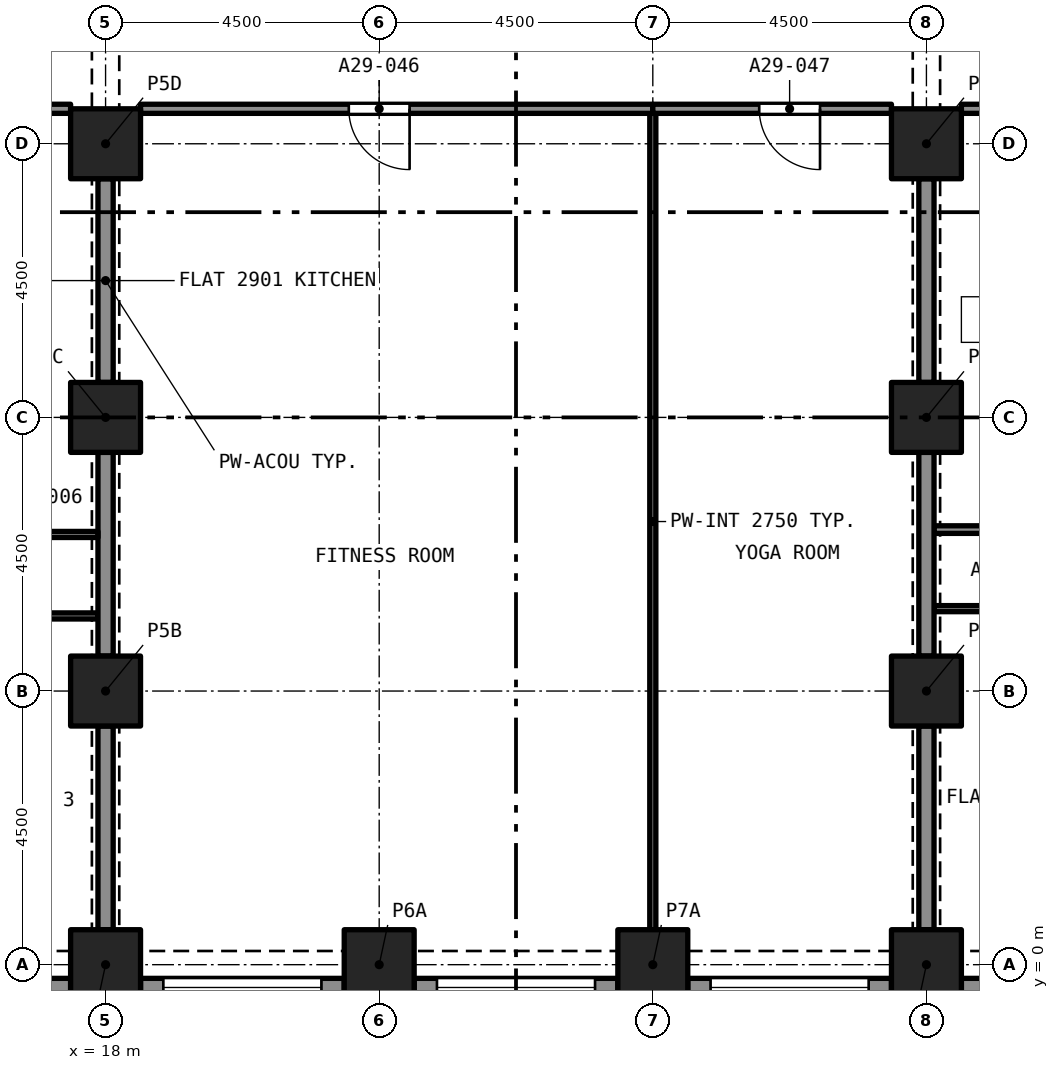
"""IFC4 building model, lengths in metres.
Left out: names, types, materials, properties, quantities, classifications, styles, units other than length and angle.
Written with IfcOpenShell. Run it as: python <this file> out.ifc"""

import sys

from ifc_helpers import new_model, si_unit, direction, frame, frame_2d, origin, origin_2d, place, context, subcontext, project, spatial, rectangle, extrude, element, fill, save


model = new_model("IFC4")
c1 = context("Model", 3, precision=1e-05, world=origin(), true_north=direction((0.0, 1.0)))
c2 = subcontext(c1, "Body", "Model", "MODEL_VIEW")
j1 = project(units=[si_unit("LENGTHUNIT", "METRE"), si_unit("PLANEANGLEUNIT", "RADIAN")], contexts=[c1])
p1 = place(None, origin())
s1 = spatial("IfcSite", under=j1, at=p1, CompositionType="ELEMENT")
p2 = place(p1, origin())
s2 = spatial("IfcBuilding", under=s1, at=p2, CompositionType="ELEMENT")
p3 = place(p2, frame((0.0, 0.0, 105.6)))
s3 = spatial("IfcBuildingStorey", under=s2, at=p3, CompositionType="ELEMENT", Elevation=105.6)
for number, where, z_axis, x_axis in (
    (1, (18.0, 0.0, 0.0), (0.0, 0.0, 1.0), (1.0, 0.0, 0.0)),
    (2, (22.5, 0.0, 0.0), (0.0, 0.0, 1.0), (1.0, 0.0, 0.0)),
    (3, (27.0, 0.0, 0.0), (0.0, 0.0, 1.0), (1.0, 0.0, 0.0)),
    (4, (31.5, 0.0, 0.0), (0.0, 0.0, 1.0), (1.0, 0.0, 0.0)),
    (5, (18.0, 4.5, 0.0), (0.0, 0.0, 1.0), (1.0, 0.0, 0.0)),
    (6, (31.5, 4.5, 0.0), (0.0, 0.0, 1.0), (1.0, 0.0, 0.0)),
    (7, (18.0, 9.0, 0.0), (0.0, 0.0, 1.0), (1.0, 0.0, 0.0)),
    (8, (31.5, 9.0, 0.0), (0.0, 0.0, 1.0), (1.0, 0.0, 0.0)),
    (9, (18.0, 13.5, 0.0), (0.0, 0.0, 1.0), (1.0, 0.0, 0.0)),
    (10, (31.5, 13.5, 0.0), (0.0, 0.0, 1.0), (1.0, 0.0, 0.0)),
):
    element("IfcColumn", number, at=place(p3, frame(where, z_axis=z_axis, x_axis=x_axis)), inside=s3, PredefinedType="COLUMN", context=c2, shape_type="SweptSolid", body=[
        extrude(rectangle(XDim=1.15, YDim=1.15, at=origin_2d()), origin(), (0.0, 0.0, 1.0), 3.2),
    ])
p4 = place(p3, frame((17.425, -0.375, 0.0), z_axis=(0.0, 0.0, 1.0), x_axis=(-1.0, 0.0, 0.0)))
e11 = element("IfcWall", 11, at=p4, inside=s3, PredefinedType="SOLIDWALL", context=c2, shape_type="SweptSolid", body=[
    extrude(rectangle(XDim=3.35, YDim=0.3, at=frame_2d((1.675, 0.0))), origin(), (0.0, 0.0, 1.0), 3.2),
])
p5 = place(p4, frame((0.375, 0.0, 0.45)))
e12 = element("IfcOpeningElement", 12, at=p5, cuts=e11, PredefinedType="OPENING", context=c2, shape_type="SweptSolid", body=[
    extrude(rectangle(XDim=2.6, YDim=1.95, at=frame_2d((1.3, 0.975))), frame((0.0, 0.16, 0.0), z_axis=(0.0, -1.0, 0.0), x_axis=(1.0, 0.0, 0.0)), (0.0, 0.0, 1.0), 0.32),
])
p6 = place(p3, frame((21.925, -0.375, 0.0), z_axis=(0.0, 0.0, 1.0), x_axis=(-1.0, 0.0, 0.0)))
e13 = element("IfcWall", 13, at=p6, inside=s3, PredefinedType="SOLIDWALL", context=c2, shape_type="SweptSolid", body=[
    extrude(rectangle(XDim=3.35, YDim=0.3, at=frame_2d((1.675, 0.0))), origin(), (0.0, 0.0, 1.0), 3.2),
])
p7 = place(p6, frame((0.375, 0.0, 0.45)))
e14 = element("IfcOpeningElement", 14, at=p7, cuts=e13, PredefinedType="OPENING", context=c2, shape_type="SweptSolid", body=[
    extrude(rectangle(XDim=2.6, YDim=1.95, at=frame_2d((1.3, 0.975))), frame((0.0, 0.16, 0.0), z_axis=(0.0, -1.0, 0.0), x_axis=(1.0, 0.0, 0.0)), (0.0, 0.0, 1.0), 0.32),
])
p8 = place(p3, frame((26.425, -0.375, 0.0), z_axis=(0.0, 0.0, 1.0), x_axis=(-1.0, 0.0, 0.0)))
e15 = element("IfcWall", 15, at=p8, inside=s3, PredefinedType="SOLIDWALL", context=c2, shape_type="SweptSolid", body=[
    extrude(rectangle(XDim=3.35, YDim=0.3, at=frame_2d((1.675, 0.0))), origin(), (0.0, 0.0, 1.0), 3.2),
])
p9 = place(p8, frame((0.375, 0.0, 0.45)))
e16 = element("IfcOpeningElement", 16, at=p9, cuts=e15, PredefinedType="OPENING", context=c2, shape_type="SweptSolid", body=[
    extrude(rectangle(XDim=2.6, YDim=1.95, at=frame_2d((1.3, 0.975))), frame((0.0, 0.16, 0.0), z_axis=(0.0, -1.0, 0.0), x_axis=(1.0, 0.0, 0.0)), (0.0, 0.0, 1.0), 0.32),
])
p10 = place(p3, frame((30.925, -0.375, 0.0), z_axis=(0.0, 0.0, 1.0), x_axis=(-1.0, 0.0, 0.0)))
e17 = element("IfcWall", 17, at=p10, inside=s3, PredefinedType="SOLIDWALL", context=c2, shape_type="SweptSolid", body=[
    extrude(rectangle(XDim=3.35, YDim=0.3, at=frame_2d((1.675, 0.0))), origin(), (0.0, 0.0, 1.0), 3.2),
])
p11 = place(p10, frame((0.375, 0.0, 0.45)))
e18 = element("IfcOpeningElement", 18, at=p11, cuts=e17, PredefinedType="OPENING", context=c2, shape_type="SweptSolid", body=[
    extrude(rectangle(XDim=2.6, YDim=1.95, at=frame_2d((1.3, 0.975))), frame((0.0, 0.16, 0.0), z_axis=(0.0, -1.0, 0.0), x_axis=(1.0, 0.0, 0.0)), (0.0, 0.0, 1.0), 0.32),
])
p12 = place(p3, frame((35.425, -0.375, 0.0), z_axis=(0.0, 0.0, 1.0), x_axis=(-1.0, 0.0, 0.0)))
e19 = element("IfcWall", 19, at=p12, inside=s3, PredefinedType="SOLIDWALL", context=c2, shape_type="SweptSolid", body=[
    extrude(rectangle(XDim=3.35, YDim=0.3, at=frame_2d((1.675, 0.0))), origin(), (0.0, 0.0, 1.0), 3.2),
])
p13 = place(p12, frame((0.375, 0.0, 0.45)))
e20 = element("IfcOpeningElement", 20, at=p13, cuts=e19, PredefinedType="OPENING", context=c2, shape_type="SweptSolid", body=[
    extrude(rectangle(XDim=2.6, YDim=1.95, at=frame_2d((1.3, 0.975))), frame((0.0, 0.16, 0.0), z_axis=(0.0, -1.0, 0.0), x_axis=(1.0, 0.0, 0.0)), (0.0, 0.0, 1.0), 0.32),
])
p14 = place(p3, frame((17.875, 5.735, 0.0), z_axis=(0.0, 0.0, 1.0), x_axis=(-1.0, 0.0, 0.0)))
e21 = element("IfcWall", 21, at=p14, inside=s3, PredefinedType="PARTITIONING", context=c2, shape_type="SweptSolid", body=[
    extrude(rectangle(XDim=4.375, YDim=0.1, at=frame_2d((2.188, 0.0))), origin(), (0.0, 0.0, 1.0), 2.9),
])
p15 = place(p14, frame((1.675, 0.0, 0.0)))
e22 = element("IfcOpeningElement", 22, at=p15, cuts=e21, PredefinedType="OPENING", context=c2, shape_type="SweptSolid", body=[
    extrude(rectangle(XDim=0.9, YDim=2.1, at=frame_2d((0.45, 1.05))), frame((0.0, 0.06, 0.0), z_axis=(0.0, -1.0, 0.0), x_axis=(1.0, 0.0, 0.0)), (0.0, 0.0, 1.0), 0.12),
])
for number, where, z_axis, x_axis in (
    (23, (18.0, 5.075, 0.0), (0.0, 0.0, 1.0), (0.0, 1.0, 0.0)),
    (24, (18.0, 0.575, 0.0), (0.0, 0.0, 1.0), (0.0, 1.0, 0.0)),
):
    element("IfcWall", number, at=place(p3, frame(where, z_axis=z_axis, x_axis=x_axis)), inside=s3, PredefinedType="PARTITIONING", context=c2, shape_type="SweptSolid", body=[
        extrude(rectangle(XDim=3.35, YDim=0.25, at=frame_2d((1.675, 0.0))), origin(), (0.0, 0.0, 1.0), 2.38),
    ])
p16 = place(p3, frame((15.175, 7.075, 0.0), z_axis=(0.0, 0.0, 1.0), x_axis=(1.0, 0.0, 0.0)))
e25 = element("IfcWall", 25, at=p16, inside=s3, PredefinedType="PARTITIONING", context=c2, shape_type="SweptSolid", body=[
    extrude(rectangle(XDim=2.7, YDim=0.1, at=frame_2d((1.35, 0.0))), origin(), (0.0, 0.0, 1.0), 2.9),
])
p17 = place(p16, frame((0.988, 0.0, 0.0)))
e26 = element("IfcOpeningElement", 26, at=p17, cuts=e25, PredefinedType="OPENING", context=c2, shape_type="SweptSolid", body=[
    extrude(rectangle(XDim=0.9, YDim=2.1, at=frame_2d((0.45, 1.05))), frame((0.0, 0.06, 0.0), z_axis=(0.0, -1.0, 0.0), x_axis=(1.0, 0.0, 0.0)), (0.0, 0.0, 1.0), 0.12),
])
p18 = place(p3, frame((18.0, 9.575, 0.0), z_axis=(0.0, 0.0, 1.0), x_axis=(0.0, 1.0, 0.0)))
e27 = element("IfcWall", 27, at=p18, inside=s3, PredefinedType="PARTITIONING", context=c2, shape_type="SweptSolid", body=[
    extrude(rectangle(XDim=3.35, YDim=0.25, at=frame_2d((1.675, 0.0))), origin(), (0.0, 0.0, 1.0), 2.38),
])
p19 = place(p3, frame((15.225, 14.075, 0.0), z_axis=(0.0, 0.0, 1.0), x_axis=(1.0, 0.0, 0.0)))
e28 = element("IfcWall", 28, at=p19, inside=s3, PredefinedType="PARTITIONING", context=c2, shape_type="SweptSolid", body=[
    extrude(rectangle(XDim=2.2, YDim=0.15, at=frame_2d((1.1, 0.0))), origin(), (0.0, 0.0, 1.0), 2.9),
])
p20 = place(p3, frame((31.625, 7.155, 0.0), z_axis=(0.0, 0.0, 1.0), x_axis=(1.0, 0.0, 0.0)))
e29 = element("IfcWall", 29, at=p20, inside=s3, PredefinedType="PARTITIONING", context=c2, shape_type="SweptSolid", body=[
    extrude(rectangle(XDim=2.662, YDim=0.125, at=frame_2d((1.331, 0.0))), origin(), (0.0, 0.0, 1.0), 2.9),
])
p21 = place(p20, frame((0.868, 0.0, 0.0)))
e30 = element("IfcOpeningElement", 30, at=p21, cuts=e29, PredefinedType="OPENING", context=c2, shape_type="SweptSolid", body=[
    extrude(rectangle(XDim=0.8, YDim=2.1, at=frame_2d((0.4, 1.05))), frame((0.0, 0.073, 0.0), z_axis=(0.0, -1.0, 0.0), x_axis=(1.0, 0.0, 0.0)), (0.0, 0.0, 1.0), 0.145),
])
p22 = place(p3, frame((31.5, 9.575, 0.0), z_axis=(0.0, 0.0, 1.0), x_axis=(0.0, 1.0, 0.0)))
e31 = element("IfcWall", 31, at=p22, inside=s3, PredefinedType="PARTITIONING", context=c2, shape_type="SweptSolid", body=[
    extrude(rectangle(XDim=3.35, YDim=0.25, at=frame_2d((1.675, 0.0))), origin(), (0.0, 0.0, 1.0), 2.38),
])
p23 = place(p3, frame((32.075, 14.075, 0.0), z_axis=(0.0, 0.0, 1.0), x_axis=(1.0, 0.0, 0.0)))
e32 = element("IfcWall", 32, at=p23, inside=s3, PredefinedType="PARTITIONING", context=c2, shape_type="SweptSolid", body=[
    extrude(rectangle(XDim=5.575, YDim=0.15, at=frame_2d((2.788, 0.0))), origin(), (0.0, 0.0, 1.0), 2.9),
])
p24 = place(p3, frame((36.0, 5.855, 0.0), z_axis=(0.0, 0.0, 1.0), x_axis=(-1.0, 0.0, 0.0)))
e33 = element("IfcWall", 33, at=p24, inside=s3, PredefinedType="PARTITIONING", context=c2, shape_type="SweptSolid", body=[
    extrude(rectangle(XDim=4.375, YDim=0.1, at=frame_2d((2.188, 0.0))), origin(), (0.0, 0.0, 1.0), 2.9),
])
p25 = place(p24, frame((1.75, 0.0, 0.0)))
e34 = element("IfcOpeningElement", 34, at=p25, cuts=e33, PredefinedType="OPENING", context=c2, shape_type="SweptSolid", body=[
    extrude(rectangle(XDim=1.0, YDim=2.1, at=frame_2d((0.5, 1.05))), frame((0.0, 0.06, 0.0), z_axis=(0.0, -1.0, 0.0), x_axis=(1.0, 0.0, 0.0)), (0.0, 0.0, 1.0), 0.12),
])
for number, where, z_axis, x_axis in (
    (35, (31.5, 0.575, 0.0), (0.0, 0.0, 1.0), (0.0, 1.0, 0.0)),
    (36, (31.5, 5.075, 0.0), (0.0, 0.0, 1.0), (0.0, 1.0, 0.0)),
):
    element("IfcWall", number, at=place(p3, frame(where, z_axis=z_axis, x_axis=x_axis)), inside=s3, PredefinedType="PARTITIONING", context=c2, shape_type="SweptSolid", body=[
        extrude(rectangle(XDim=3.35, YDim=0.25, at=frame_2d((1.675, 0.0))), origin(), (0.0, 0.0, 1.0), 2.38),
    ])
p26 = place(p3, frame((27.0, 0.575, 0.0), z_axis=(0.0, 0.0, 1.0), x_axis=(0.0, 1.0, 0.0)))
e37 = element("IfcWall", 37, at=p26, inside=s3, PredefinedType="PARTITIONING", context=c2, shape_type="SweptSolid", body=[
    extrude(rectangle(XDim=13.425, YDim=0.1, at=frame_2d((6.712, 0.0))), origin(), (0.0, 0.0, 1.0), 2.75),
])
p27 = place(p3, frame((27.0, 14.075, 0.0), z_axis=(0.0, 0.0, 1.0), x_axis=(-1.0, 0.0, 0.0)))
e38 = element("IfcWall", 38, at=p27, inside=s3, PredefinedType="PARTITIONING", context=c2, shape_type="SweptSolid", body=[
    extrude(rectangle(XDim=8.425, YDim=0.15, at=frame_2d((4.212, 0.0))), origin(), (0.0, 0.0, 1.0), 2.75),
])
p28 = place(p27, frame((4.0, 0.0, 0.0)))
e39 = element("IfcOpeningElement", 39, at=p28, cuts=e38, PredefinedType="OPENING", context=c2, shape_type="SweptSolid", body=[
    extrude(rectangle(XDim=1.0, YDim=2.1, at=frame_2d((0.5, 1.05))), frame((0.0, 0.085, 0.0), z_axis=(0.0, -1.0, 0.0), x_axis=(1.0, 0.0, 0.0)), (0.0, 0.0, 1.0), 0.17),
])
p29 = place(p3, frame((30.925, 14.075, 0.0), z_axis=(0.0, 0.0, 1.0), x_axis=(-1.0, 0.0, 0.0)))
e40 = element("IfcWall", 40, at=p29, inside=s3, PredefinedType="PARTITIONING", context=c2, shape_type="SweptSolid", body=[
    extrude(rectangle(XDim=3.925, YDim=0.15, at=frame_2d((1.962, 0.0))), origin(), (0.0, 0.0, 1.0), 2.75),
])
p30 = place(p29, frame((1.175, 0.0, 0.0)))
e41 = element("IfcOpeningElement", 41, at=p30, cuts=e40, PredefinedType="OPENING", context=c2, shape_type="SweptSolid", body=[
    extrude(rectangle(XDim=1.0, YDim=2.1, at=frame_2d((0.5, 1.05))), frame((0.0, 0.085, 0.0), z_axis=(0.0, -1.0, 0.0), x_axis=(1.0, 0.0, 0.0)), (0.0, 0.0, 1.0), 0.17),
])
p31 = place(p7, origin())
e42 = element("IfcWindow", 42, at=p31, inside=s3, PartitioningType="SINGLE_PANEL", PredefinedType="WINDOW", context=c2, shape_type="SweptSolid", body=[
    extrude(rectangle(XDim=2.6, YDim=1.95, at=frame_2d((1.3, 0.975))), frame((0.0, 0.03, 0.0), z_axis=(0.0, -1.0, 0.0), x_axis=(1.0, 0.0, 0.0)), (0.0, 0.0, 1.0), 0.06),
])
fill(e14, e42)
p32 = place(p9, origin())
e43 = element("IfcWindow", 43, at=p32, inside=s3, PartitioningType="SINGLE_PANEL", PredefinedType="WINDOW", context=c2, shape_type="SweptSolid", body=[
    extrude(rectangle(XDim=2.6, YDim=1.95, at=frame_2d((1.3, 0.975))), frame((0.0, 0.03, 0.0), z_axis=(0.0, -1.0, 0.0), x_axis=(1.0, 0.0, 0.0)), (0.0, 0.0, 1.0), 0.06),
])
fill(e16, e43)
p33 = place(p11, origin())
e44 = element("IfcWindow", 44, at=p33, inside=s3, PartitioningType="SINGLE_PANEL", PredefinedType="WINDOW", context=c2, shape_type="SweptSolid", body=[
    extrude(rectangle(XDim=2.6, YDim=1.95, at=frame_2d((1.3, 0.975))), frame((0.0, 0.03, 0.0), z_axis=(0.0, -1.0, 0.0), x_axis=(1.0, 0.0, 0.0)), (0.0, 0.0, 1.0), 0.06),
])
fill(e18, e44)
p34 = place(p28, origin())
e45 = element("IfcDoor", 45, at=p34, inside=s3, OperationType="SINGLE_SWING_RIGHT", PredefinedType="DOOR", context=c2, shape_type="SweptSolid", body=[
    extrude(rectangle(XDim=1.0, YDim=2.1, at=frame_2d((0.5, 1.05))), frame((0.0, 0.025, 0.0), z_axis=(0.0, -1.0, 0.0), x_axis=(1.0, 0.0, 0.0)), (0.0, 0.0, 1.0), 0.05),
])
fill(e39, e45)
p35 = place(p30, origin())
e46 = element("IfcDoor", 46, at=p35, inside=s3, OperationType="SINGLE_SWING_LEFT", PredefinedType="DOOR", context=c2, shape_type="SweptSolid", body=[
    extrude(rectangle(XDim=1.0, YDim=2.1, at=frame_2d((0.5, 1.05))), frame((0.0, 0.025, 0.0), z_axis=(0.0, -1.0, 0.0), x_axis=(1.0, 0.0, 0.0)), (0.0, 0.0, 1.0), 0.05),
])
fill(e41, e46)
save(model, sys.argv[1])
